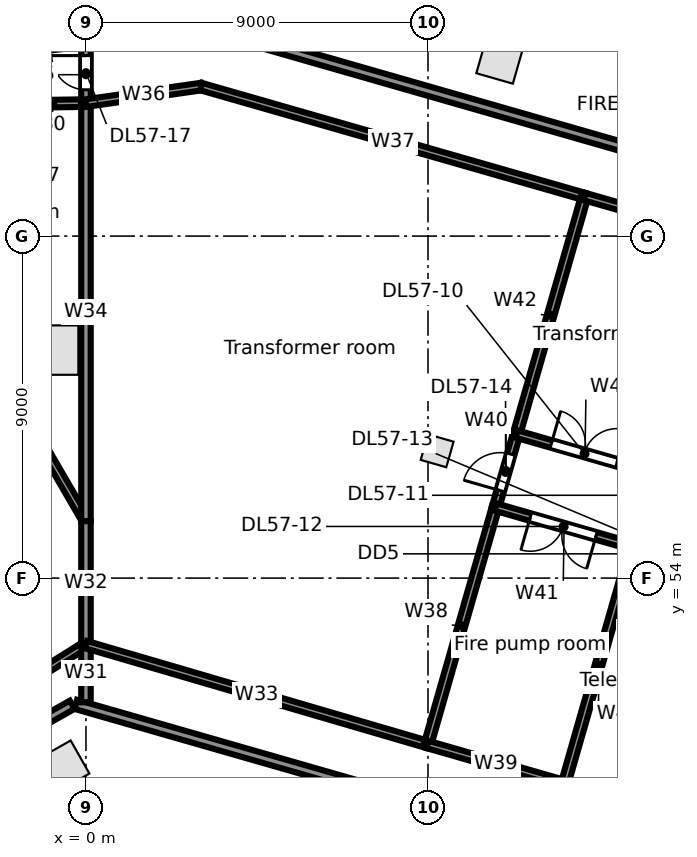
"""IFC4 building model, lengths in metres.
Left out: names, types, materials, properties, quantities, classifications, styles, units other than length and angle.
Written with IfcOpenShell. Run it as: python <this file> out.ifc"""

import sys

from ifc_helpers import new_model, si_unit, direction, frame, frame_2d, origin, origin_2d, place, context, subcontext, project, spatial, rectangle, extrude, element, fill, save


model = new_model("IFC4")
c1 = context("Model", 3, precision=1e-05, world=origin(), true_north=direction((0.0, 1.0)))
c2 = subcontext(c1, "Body", "Model", "MODEL_VIEW")
j1 = project(units=[si_unit("LENGTHUNIT", "METRE"), si_unit("PLANEANGLEUNIT", "RADIAN")], contexts=[c1])
p1 = place(None, origin())
s1 = spatial("IfcSite", under=j1, at=p1, CompositionType="ELEMENT")
p2 = place(p1, origin())
s2 = spatial("IfcBuilding", under=s1, at=p2, CompositionType="ELEMENT")
p3 = place(p2, frame((0.0, 0.0, 258.2)))
s3 = spatial("IfcBuildingStorey", under=s2, at=p3, CompositionType="ELEMENT", Elevation=258.2)
for number, where, z_axis, x_axis in (
    (1, (10.89, 67.629, 0.0), (0.0, 0.0, 1.0), (-0.961, 0.276, 0.0)),
    (2, (-0.591, 49.044, 0.0), (0.0, 0.0, 1.0), (0.87, 0.492, 0.0)),
):
    element("IfcColumn", number, at=place(p3, frame(where, z_axis=z_axis, x_axis=x_axis)), inside=s3, PredefinedType="COLUMN", context=c2, shape_type="SweptSolid", body=[
        extrude(rectangle(XDim=1.0, YDim=1.0, at=origin_2d()), origin(), (0.0, 0.0, 1.0), 4.22),
    ])
p4 = place(p3, frame((-0.85, 60.0, 0.0), z_axis=(0.0, 0.0, 1.0), x_axis=(0.0, 1.0, 0.0)))
e3 = element("IfcColumn", 3, at=p4, inside=s3, PredefinedType="COLUMN", context=c2, shape_type="SweptSolid", body=[
    extrude(rectangle(XDim=1.3, YDim=1.3, at=origin_2d()), origin(), (0.0, 0.0, 1.0), 4.5),
])
p5 = place(p3, frame((9.241, 57.35, 0.0), z_axis=(0.0, 0.0, 1.0), x_axis=(0.961261695938, -0.275637355817, 0.0)))
e4 = element("IfcColumn", 4, at=p5, inside=s3, PredefinedType="COLUMN", context=c2, shape_type="SweptSolid", body=[
    extrude(rectangle(XDim=0.7, YDim=0.7, at=origin_2d()), origin(), (0.0, 0.0, 1.0), 4.22),
])
p6 = place(p3, frame((-0.364, 50.666, 0.0), z_axis=(0.0, 0.0, 1.0), x_axis=(-0.870355021882, -0.492424751494, 0.0)))
e5 = element("IfcWall", 5, at=p6, inside=s3, PredefinedType="STANDARD", context=c2, shape_type="SweptSolid", body=[
    extrude(rectangle(XDim=44.126, YDim=0.25, at=frame_2d((22.063, 0.0))), origin(), (0.0, 0.0, 1.0), 3.12),
])
p7 = place(p3, frame((23.919, 43.742, 0.0), z_axis=(0.0, 0.0, 1.0), x_axis=(-0.96126099052, 0.27563981589, 0.0)))
e6 = element("IfcWall", 6, at=p7, inside=s3, PredefinedType="STANDARD", context=c2, shape_type="SweptSolid", body=[
    extrude(rectangle(XDim=25.163, YDim=0.25, at=frame_2d((12.581, 0.0))), origin(), (0.0, 0.0, 1.0), 3.52),
])
p8 = place(p3, frame((3.135, 68.5, 0.0), z_axis=(0.0, 0.0, 1.0), x_axis=(0.961262369705, -0.275635006103, 0.0)))
e7 = element("IfcWall", 7, at=p8, inside=s3, PredefinedType="STANDARD", context=c2, shape_type="SweptSolid", body=[
    extrude(rectangle(XDim=32.562, YDim=0.25, at=frame_2d((16.281, 0.0))), origin(), (0.0, 0.0, 1.0), 3.52),
])
p9 = place(p3, frame((-2.278, 67.85, 0.0), z_axis=(0.0, 0.0, 1.0), x_axis=(0.993072509993, 0.117503148449, 0.0)))
e8 = element("IfcWall", 8, at=p9, inside=s3, PredefinedType="STANDARD", context=c2, shape_type="SweptSolid", body=[
    extrude(rectangle(XDim=5.5, YDim=0.25, at=frame_2d((2.75, 0.0))), origin(), (0.0, 0.0, 1.0), 3.52),
])
p10 = place(p3, frame((-5.238, 64.505, 0.0), z_axis=(0.0, 0.0, 1.0), x_axis=(0.502809852725, -0.864397045346, 0.0)))
e9 = element("IfcWall", 9, at=p10, inside=s3, PredefinedType="PARTITIONING", context=c2, shape_type="SweptSolid", body=[
    extrude(rectangle(XDim=10.417, YDim=0.2, at=frame_2d((5.209, 0.0))), origin(), (0.0, 0.0, 1.0), 3.4),
])
p11 = place(p3, frame((-4.821, 49.23, 0.0), z_axis=(0.0, 0.0, 1.0), x_axis=(0.847455386679, 0.530866619396, 0.0)))
e10 = element("IfcWall", 10, at=p11, inside=s3, PredefinedType="PARTITIONING", context=c2, shape_type="SweptSolid", body=[
    extrude(rectangle(XDim=5.689, YDim=0.2, at=frame_2d((2.844, 0.0))), origin(), (0.0, 0.0, 1.0), 3.4),
])
p12 = place(p3, frame((-1.757, 66.474, 0.0), z_axis=(0.0, 0.0, 1.0), x_axis=(0.999891555363, 0.014726761827, 0.0)))
e11 = element("IfcWall", 11, at=p12, inside=s3, PredefinedType="PARTITIONING", context=c2, shape_type="SweptSolid", body=[
    extrude(rectangle(XDim=1.757, YDim=0.2, at=frame_2d((0.879, 0.0))), origin(), (0.0, 0.0, 1.0), 3.5),
])
p13 = place(p3, frame((0.0, 50.731, 0.0), z_axis=(0.0, 0.0, 1.0), x_axis=(0.0, 1.0, 0.0)))
e12 = element("IfcWall", 12, at=p13, inside=s3, PredefinedType="PARTITIONING", context=c2, shape_type="SweptSolid", body=[
    extrude(rectangle(XDim=1.519, YDim=0.25, at=frame_2d((0.76, 0.0))), origin(), (0.0, 0.0, 1.0), 4.22),
])
p14 = place(p3, frame((0.0, 52.25, 0.0), z_axis=(0.0, 0.0, 1.0), x_axis=(0.0, 1.0, 0.0)))
e13 = element("IfcWall", 13, at=p14, inside=s3, PredefinedType="PARTITIONING", context=c2, shape_type="SweptSolid", body=[
    extrude(rectangle(XDim=3.25, YDim=0.25, at=frame_2d((1.625, 0.0))), origin(), (0.0, 0.0, 1.0), 4.22),
])
p15 = place(p3, frame((0.0, 52.25, 0.0), z_axis=(0.0, 0.0, 1.0), x_axis=(0.959779227721, -0.280755826359, 0.0)))
e14 = element("IfcWall", 14, at=p15, inside=s3, PredefinedType="PARTITIONING", context=c2, shape_type="SweptSolid", body=[
    extrude(rectangle(XDim=9.364, YDim=0.2, at=frame_2d((4.682, 0.0))), origin(), (0.0, 0.0, 1.0), 3.5),
])
p16 = place(p3, frame((0.0, 55.5, 0.0), z_axis=(0.0, 0.0, 1.0), x_axis=(0.0, 1.0, 0.0)))
e15 = element("IfcWall", 15, at=p16, inside=s3, PredefinedType="PARTITIONING", context=c2, shape_type="SweptSolid", body=[
    extrude(rectangle(XDim=11.0, YDim=0.25, at=frame_2d((5.5, 0.0))), origin(), (0.0, 0.0, 1.0), 3.5),
])
p17 = place(p3, frame((0.0, 66.5, 0.0), z_axis=(0.0, 0.0, 1.0), x_axis=(0.0, 1.0, 0.0)))
e16 = element("IfcWall", 16, at=p17, inside=s3, PredefinedType="PARTITIONING", context=c2, shape_type="SweptSolid", body=[
    extrude(rectangle(XDim=1.494, YDim=0.25, at=frame_2d((0.747, 0.0))), origin(), (0.0, 0.0, 1.0), 3.5),
])
p18 = place(p17, frame((0.35, 0.0, 0.0)))
e17 = element("IfcOpeningElement", 17, at=p18, cuts=e16, PredefinedType="OPENING", context=c2, shape_type="SweptSolid", body=[
    extrude(rectangle(XDim=0.9, YDim=2.1, at=frame_2d((0.45, 1.05))), frame((0.0, 0.135, 0.0), z_axis=(0.0, -1.0, 0.0), x_axis=(1.0, 0.0, 0.0)), (0.0, 0.0, 1.0), 0.27),
])
p19 = place(p3, frame((0.0, 66.5, 0.0), z_axis=(0.0, 0.0, 1.0), x_axis=(0.989887165849, 0.1418569663, 0.0)))
e18 = element("IfcWall", 18, at=p19, inside=s3, PredefinedType="PARTITIONING", context=c2, shape_type="SweptSolid", body=[
    extrude(rectangle(XDim=3.06, YDim=0.2, at=frame_2d((1.53, 0.0))), origin(), (0.0, 0.0, 1.0), 3.5),
])
p20 = place(p3, frame((3.029, 66.934, 0.0), z_axis=(0.0, 0.0, 1.0), x_axis=(0.961263796718, -0.275630029421, 0.0)))
e19 = element("IfcWall", 19, at=p20, inside=s3, PredefinedType="PARTITIONING", context=c2, shape_type="SweptSolid", body=[
    extrude(rectangle(XDim=10.5, YDim=0.2, at=frame_2d((5.25, 0.0))), origin(), (0.0, 0.0, 1.0), 3.5),
])
p21 = place(p3, frame((8.987, 49.621, 0.0), z_axis=(0.0, 0.0, 1.0), x_axis=(0.275703259795, 0.961242795832, 0.0)))
e20 = element("IfcWall", 20, at=p21, inside=s3, PredefinedType="PARTITIONING", context=c2, shape_type="SweptSolid", body=[
    extrude(rectangle(XDim=6.5, YDim=0.2, at=frame_2d((3.25, 0.0))), origin(), (0.0, 0.0, 1.0), 3.5),
])
p22 = place(p3, frame((8.987, 49.621, 0.0), z_axis=(0.0, 0.0, 1.0), x_axis=(0.961228613303, -0.275752702557, 0.0)))
e21 = element("IfcWall", 21, at=p22, inside=s3, PredefinedType="PARTITIONING", context=c2, shape_type="SweptSolid", body=[
    extrude(rectangle(XDim=3.75, YDim=0.2, at=frame_2d((1.875, 0.0))), origin(), (0.0, 0.0, 1.0), 3.5),
])
p23 = place(p3, frame((10.779, 55.869, 0.0), z_axis=(0.0, 0.0, 1.0), x_axis=(0.275575706981, 0.961279371318, 0.0)))
e22 = element("IfcWall", 22, at=p23, inside=s3, PredefinedType="PARTITIONING", context=c2, shape_type="SweptSolid", body=[
    extrude(rectangle(XDim=2.0, YDim=0.2, at=frame_2d((1.0, 0.0))), origin(), (0.0, 0.0, 1.0), 4.22),
])
p24 = place(p23, frame((0.45, 0.0, 0.0)))
e23 = element("IfcOpeningElement", 23, at=p24, cuts=e22, PredefinedType="OPENING", context=c2, shape_type="SweptSolid", body=[
    extrude(rectangle(XDim=1.0, YDim=2.1, at=frame_2d((0.5, 1.05))), frame((0.0, 0.11, 0.0), z_axis=(0.0, -1.0, 0.0), x_axis=(1.0, 0.0, 0.0)), (0.0, 0.0, 1.0), 0.22),
])
p25 = place(p3, frame((10.779, 55.869, 0.0), z_axis=(0.0, 0.0, 1.0), x_axis=(0.961245866545, -0.275692553489, 0.0)))
e24 = element("IfcWall", 24, at=p25, inside=s3, PredefinedType="PARTITIONING", context=c2, shape_type="SweptSolid", body=[
    extrude(rectangle(XDim=3.75, YDim=0.2, at=frame_2d((1.875, 0.0))), origin(), (0.0, 0.0, 1.0), 4.22),
])
p26 = place(p25, frame((0.95, 0.0, 0.0)))
e25 = element("IfcOpeningElement", 25, at=p26, cuts=e24, PredefinedType="OPENING", context=c2, shape_type="SweptSolid", body=[
    extrude(rectangle(XDim=1.8, YDim=2.1, at=frame_2d((0.9, 1.05))), frame((0.0, 0.11, 0.0), z_axis=(0.0, -1.0, 0.0), x_axis=(1.0, 0.0, 0.0)), (0.0, 0.0, 1.0), 0.22),
])
p27 = place(p3, frame((11.33, 57.791, 0.0), z_axis=(0.0, 0.0, 1.0), x_axis=(0.27565349575, 0.96125706774, 0.0)))
e26 = element("IfcWall", 26, at=p27, inside=s3, PredefinedType="PARTITIONING", context=c2, shape_type="SweptSolid", body=[
    extrude(rectangle(XDim=6.501, YDim=0.2, at=frame_2d((3.25, 0.0))), origin(), (0.0, 0.0, 1.0), 4.22),
])
p28 = place(p3, frame((11.33, 57.791, 0.0), z_axis=(0.0, 0.0, 1.0), x_axis=(0.961314848061, -0.275451924837, 0.0)))
e27 = element("IfcWall", 27, at=p28, inside=s3, PredefinedType="PARTITIONING", context=c2, shape_type="SweptSolid", body=[
    extrude(rectangle(XDim=3.75, YDim=0.2, at=frame_2d((1.875, 0.0))), origin(), (0.0, 0.0, 1.0), 4.22),
])
p29 = place(p28, frame((0.95, 0.0, 0.0)))
e28 = element("IfcOpeningElement", 28, at=p29, cuts=e27, PredefinedType="OPENING", context=c2, shape_type="SweptSolid", body=[
    extrude(rectangle(XDim=1.8, YDim=2.1, at=frame_2d((0.9, 1.05))), frame((0.0, 0.11, 0.0), z_axis=(0.0, -1.0, 0.0), x_axis=(1.0, 0.0, 0.0)), (0.0, 0.0, 1.0), 0.22),
])
p30 = place(p3, frame((12.592, 48.587, 0.0), z_axis=(0.0, 0.0, 1.0), x_axis=(0.275693305607, 0.961245650832, 0.0)))
e29 = element("IfcWall", 29, at=p30, inside=s3, PredefinedType="PARTITIONING", context=c2, shape_type="SweptSolid", body=[
    extrude(rectangle(XDim=6.5, YDim=0.2, at=frame_2d((3.25, 0.0))), origin(), (0.0, 0.0, 1.0), 4.22),
])
p31 = place(p3, frame((13.122, 64.04, 0.0), z_axis=(0.0, 0.0, 1.0), x_axis=(0.961245866545, -0.275692553489, 0.0)))
e30 = element("IfcWall", 30, at=p31, inside=s3, PredefinedType="PARTITIONING", context=c2, shape_type="SweptSolid", body=[
    extrude(rectangle(XDim=3.75, YDim=0.2, at=frame_2d((1.875, 0.0))), origin(), (0.0, 0.0, 1.0), 4.22),
])
p32 = place(p29, origin())
e31 = element("IfcDoor", 31, at=p32, inside=s3, OperationType="DOUBLE_DOOR_SINGLE_SWING", PredefinedType="DOOR", context=c2, shape_type="SweptSolid", body=[
    extrude(rectangle(XDim=1.8, YDim=2.1, at=frame_2d((0.9, 1.05))), frame((0.0, 0.025, 0.0), z_axis=(0.0, -1.0, 0.0), x_axis=(1.0, 0.0, 0.0)), (0.0, 0.0, 1.0), 0.05),
])
fill(e28, e31)
p33 = place(p26, frame((1.8, 0.0, 0.0), z_axis=(0.0, 0.0, 1.0), x_axis=(-1.0, 0.0, 0.0)))
e32 = element("IfcDoor", 32, at=p33, inside=s3, OperationType="DOUBLE_DOOR_SINGLE_SWING", PredefinedType="DOOR", context=c2, shape_type="SweptSolid", body=[
    extrude(rectangle(XDim=1.8, YDim=2.1, at=frame_2d((0.9, 1.05))), frame((0.0, 0.025, 0.0), z_axis=(0.0, -1.0, 0.0), x_axis=(1.0, 0.0, 0.0)), (0.0, 0.0, 1.0), 0.05),
])
fill(e25, e32)
p34 = place(p24, origin())
e33 = element("IfcDoor", 33, at=p34, inside=s3, OperationType="SINGLE_SWING_LEFT", PredefinedType="DOOR", context=c2, shape_type="SweptSolid", body=[
    extrude(rectangle(XDim=1.0, YDim=2.1, at=frame_2d((0.5, 1.05))), frame((0.0, 0.025, 0.0), z_axis=(0.0, -1.0, 0.0), x_axis=(1.0, 0.0, 0.0)), (0.0, 0.0, 1.0), 0.05),
])
fill(e23, e33)
p35 = place(p18, origin())
e34 = element("IfcDoor", 34, at=p35, inside=s3, OperationType="SINGLE_SWING_RIGHT", PredefinedType="DOOR", context=c2, shape_type="SweptSolid", body=[
    extrude(rectangle(XDim=0.9, YDim=2.1, at=frame_2d((0.45, 1.05))), frame((0.0, 0.025, 0.0), z_axis=(0.0, -1.0, 0.0), x_axis=(1.0, 0.0, 0.0)), (0.0, 0.0, 1.0), 0.05),
])
fill(e17, e34)
save(model, sys.argv[1])
